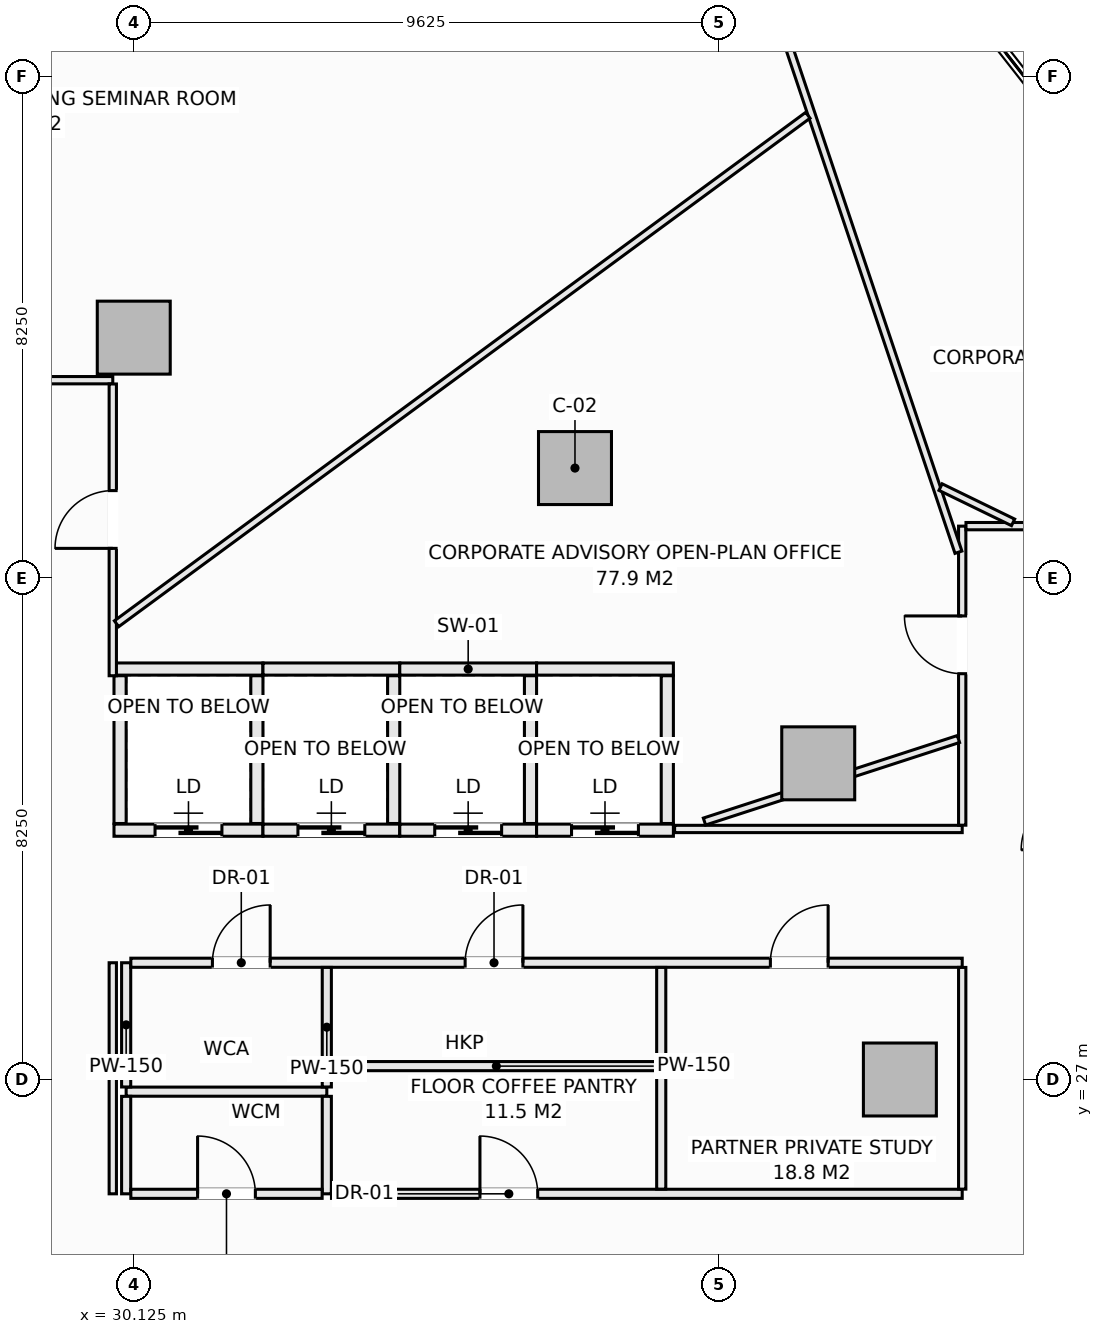
"""IFC4 building model, lengths in metres.
Left out: names, types, materials, properties, quantities, classifications, styles, units other than length and angle.
Written with IfcOpenShell. Run it as: python <this file> out.ifc"""

import sys

from ifc_helpers import new_model, si_unit, direction, frame, frame_2d, origin, origin_2d, place, context, subcontext, project, spatial, rectangle, extrude, element, fill, save


model = new_model("IFC4")
c1 = context("Model", 3, precision=1e-05, world=origin(), true_north=direction((0.0, 1.0)))
c2 = subcontext(c1, "Body", "Model", "MODEL_VIEW")
j1 = project(units=[si_unit("LENGTHUNIT", "METRE"), si_unit("PLANEANGLEUNIT", "RADIAN")], contexts=[c1])
p1 = place(None, origin())
s1 = spatial("IfcSite", under=j1, at=p1, CompositionType="ELEMENT")
p2 = place(p1, origin())
s2 = spatial("IfcBuilding", under=s1, at=p2, CompositionType="ELEMENT")
p3 = place(p2, frame((0.0, 0.0, 91.95)))
s3 = spatial("IfcBuildingStorey", under=s2, at=p3, CompositionType="ELEMENT", Elevation=91.95)
for number, where, z_axis, x_axis in (
    (1, (42.725, 27.0, -0.28), (0.0, 0.0, 1.0), (1.0, 0.0, 0.0)),
    (2, (41.382, 32.199, -0.28), (0.0, 0.0, 1.0), (1.0, 0.0, 0.0)),
    (3, (37.382, 37.055, -0.28), (0.0, 0.0, 1.0), (1.0, 0.0, 0.0)),
    (4, (30.125, 39.2, -0.28), (0.0, 0.0, 1.0), (1.0, 0.0, 0.0)),
):
    element("IfcColumn", number, at=place(p3, frame(where, z_axis=z_axis, x_axis=x_axis)), inside=s3, PredefinedType="COLUMN", context=c2, shape_type="SweptSolid", body=[
        extrude(rectangle(XDim=1.2, YDim=1.2, at=origin_2d()), origin(), (0.0, 0.0, 1.0), 3.81),
    ])
p4 = place(p3, frame((29.8, 33.75, 0.0), z_axis=(0.0, 0.0, 1.0), x_axis=(1.0, 0.0, 0.0)))
e5 = element("IfcWall", 5, at=p4, inside=s3, PredefinedType="SOLIDWALL", context=c2, shape_type="SweptSolid", body=[
    extrude(rectangle(XDim=2.45, YDim=0.2, at=frame_2d((1.225, 0.0))), origin(), (0.0, 0.0, 1.0), 3.53),
])
p5 = place(p3, frame((29.8, 31.1, 0.0), z_axis=(0.0, 0.0, 1.0), x_axis=(1.0, 0.0, 0.0)))
e6 = element("IfcWall", 6, at=p5, inside=s3, PredefinedType="SOLIDWALL", context=c2, shape_type="SweptSolid", body=[
    extrude(rectangle(XDim=2.45, YDim=0.2, at=frame_2d((1.225, 0.0))), origin(), (0.0, 0.0, 1.0), 3.53),
])
p6 = place(p5, frame((0.675, 0.0, 0.0)))
e7 = element("IfcOpeningElement", 7, at=p6, cuts=e6, PredefinedType="OPENING", context=c2, shape_type="SweptSolid", body=[
    extrude(rectangle(XDim=1.1, YDim=2.2, at=frame_2d((0.55, 1.1))), frame((0.0, 0.11, 0.0), z_axis=(0.0, -1.0, 0.0), x_axis=(1.0, 0.0, 0.0)), (0.0, 0.0, 1.0), 0.22),
])
for number, where, z_axis, x_axis in (
    (8, (29.9, 31.21, 0.0), (0.0, 0.0, 1.0), (0.0, 1.0, 0.0)),
    (9, (32.15, 31.21, 0.0), (0.0, 0.0, 1.0), (0.0, 1.0, 0.0)),
):
    element("IfcWall", number, at=place(p3, frame(where, z_axis=z_axis, x_axis=x_axis)), inside=s3, PredefinedType="SOLIDWALL", context=c2, shape_type="SweptSolid", body=[
        extrude(rectangle(XDim=2.43, YDim=0.2, at=frame_2d((1.215, 0.0))), origin(), (0.0, 0.0, 1.0), 3.53),
    ])
p7 = place(p3, frame((32.25, 33.75, 0.0), z_axis=(0.0, 0.0, 1.0), x_axis=(1.0, 0.0, 0.0)))
e10 = element("IfcWall", 10, at=p7, inside=s3, PredefinedType="SOLIDWALL", context=c2, shape_type="SweptSolid", body=[
    extrude(rectangle(XDim=2.25, YDim=0.2, at=frame_2d((1.125, 0.0))), origin(), (0.0, 0.0, 1.0), 3.53),
])
p8 = place(p3, frame((32.25, 31.1, 0.0), z_axis=(0.0, 0.0, 1.0), x_axis=(1.0, 0.0, 0.0)))
e11 = element("IfcWall", 11, at=p8, inside=s3, PredefinedType="SOLIDWALL", context=c2, shape_type="SweptSolid", body=[
    extrude(rectangle(XDim=2.25, YDim=0.2, at=frame_2d((1.125, 0.0))), origin(), (0.0, 0.0, 1.0), 3.53),
])
p9 = place(p8, frame((0.575, 0.0, 0.0)))
e12 = element("IfcOpeningElement", 12, at=p9, cuts=e11, PredefinedType="OPENING", context=c2, shape_type="SweptSolid", body=[
    extrude(rectangle(XDim=1.1, YDim=2.2, at=frame_2d((0.55, 1.1))), frame((0.0, 0.11, 0.0), z_axis=(0.0, -1.0, 0.0), x_axis=(1.0, 0.0, 0.0)), (0.0, 0.0, 1.0), 0.22),
])
p10 = place(p3, frame((34.4, 31.21, 0.0), z_axis=(0.0, 0.0, 1.0), x_axis=(0.0, 1.0, 0.0)))
e13 = element("IfcWall", 13, at=p10, inside=s3, PredefinedType="SOLIDWALL", context=c2, shape_type="SweptSolid", body=[
    extrude(rectangle(XDim=2.43, YDim=0.2, at=frame_2d((1.215, 0.0))), origin(), (0.0, 0.0, 1.0), 3.53),
])
p11 = place(p3, frame((34.5, 33.75, 0.0), z_axis=(0.0, 0.0, 1.0), x_axis=(1.0, 0.0, 0.0)))
e14 = element("IfcWall", 14, at=p11, inside=s3, PredefinedType="SOLIDWALL", context=c2, shape_type="SweptSolid", body=[
    extrude(rectangle(XDim=2.25, YDim=0.2, at=frame_2d((1.125, 0.0))), origin(), (0.0, 0.0, 1.0), 3.53),
])
p12 = place(p3, frame((34.5, 31.1, 0.0), z_axis=(0.0, 0.0, 1.0), x_axis=(1.0, 0.0, 0.0)))
e15 = element("IfcWall", 15, at=p12, inside=s3, PredefinedType="SOLIDWALL", context=c2, shape_type="SweptSolid", body=[
    extrude(rectangle(XDim=2.25, YDim=0.2, at=frame_2d((1.125, 0.0))), origin(), (0.0, 0.0, 1.0), 3.53),
])
p13 = place(p12, frame((0.575, 0.0, 0.0)))
e16 = element("IfcOpeningElement", 16, at=p13, cuts=e15, PredefinedType="OPENING", context=c2, shape_type="SweptSolid", body=[
    extrude(rectangle(XDim=1.1, YDim=2.2, at=frame_2d((0.55, 1.1))), frame((0.0, 0.11, 0.0), z_axis=(0.0, -1.0, 0.0), x_axis=(1.0, 0.0, 0.0)), (0.0, 0.0, 1.0), 0.22),
])
p14 = place(p3, frame((36.65, 31.21, 0.0), z_axis=(0.0, 0.0, 1.0), x_axis=(0.0, 1.0, 0.0)))
e17 = element("IfcWall", 17, at=p14, inside=s3, PredefinedType="SOLIDWALL", context=c2, shape_type="SweptSolid", body=[
    extrude(rectangle(XDim=2.43, YDim=0.2, at=frame_2d((1.215, 0.0))), origin(), (0.0, 0.0, 1.0), 3.53),
])
p15 = place(p3, frame((36.75, 33.75, 0.0), z_axis=(0.0, 0.0, 1.0), x_axis=(1.0, 0.0, 0.0)))
e18 = element("IfcWall", 18, at=p15, inside=s3, PredefinedType="SOLIDWALL", context=c2, shape_type="SweptSolid", body=[
    extrude(rectangle(XDim=2.25, YDim=0.2, at=frame_2d((1.125, 0.0))), origin(), (0.0, 0.0, 1.0), 3.53),
])
p16 = place(p3, frame((36.75, 31.1, 0.0), z_axis=(0.0, 0.0, 1.0), x_axis=(1.0, 0.0, 0.0)))
e19 = element("IfcWall", 19, at=p16, inside=s3, PredefinedType="SOLIDWALL", context=c2, shape_type="SweptSolid", body=[
    extrude(rectangle(XDim=2.25, YDim=0.2, at=frame_2d((1.125, 0.0))), origin(), (0.0, 0.0, 1.0), 3.53),
])
p17 = place(p16, frame((0.575, 0.0, 0.0)))
e20 = element("IfcOpeningElement", 20, at=p17, cuts=e19, PredefinedType="OPENING", context=c2, shape_type="SweptSolid", body=[
    extrude(rectangle(XDim=1.1, YDim=2.2, at=frame_2d((0.55, 1.1))), frame((0.0, 0.11, 0.0), z_axis=(0.0, -1.0, 0.0), x_axis=(1.0, 0.0, 0.0)), (0.0, 0.0, 1.0), 0.22),
])
p18 = place(p3, frame((38.9, 31.21, 0.0), z_axis=(0.0, 0.0, 1.0), x_axis=(0.0, 1.0, 0.0)))
e21 = element("IfcWall", 21, at=p18, inside=s3, PredefinedType="SOLIDWALL", context=c2, shape_type="SweptSolid", body=[
    extrude(rectangle(XDim=2.43, YDim=0.2, at=frame_2d((1.215, 0.0))), origin(), (0.0, 0.0, 1.0), 3.53),
])
p19 = place(p3, frame((30.0, 26.8, 0.0), z_axis=(0.0, 0.0, 1.0), x_axis=(1.0, 0.0, 0.0)))
e22 = element("IfcWall", 22, at=p19, inside=s3, PredefinedType="PARTITIONING", context=c2, shape_type="SweptSolid", body=[
    extrude(rectangle(XDim=3.3, YDim=0.15, at=frame_2d((1.65, 0.0))), origin(), (0.0, 0.0, 1.0), 3.53),
])
p20 = place(p3, frame((30.0, 25.12, 0.0), z_axis=(0.0, 0.0, 1.0), x_axis=(0.0, 1.0, 0.0)))
e23 = element("IfcWall", 23, at=p20, inside=s3, PredefinedType="PARTITIONING", context=c2, shape_type="SweptSolid", body=[
    extrude(rectangle(XDim=1.603, YDim=0.15, at=frame_2d((0.801, 0.0))), origin(), (0.0, 0.0, 1.0), 3.53),
])
p21 = place(p3, frame((30.0, 26.877, 0.0), z_axis=(0.0, 0.0, 1.0), x_axis=(0.0, 1.0, 0.0)))
e24 = element("IfcWall", 24, at=p21, inside=s3, PredefinedType="PARTITIONING", context=c2, shape_type="SweptSolid", body=[
    extrude(rectangle(XDim=2.043, YDim=0.15, at=frame_2d((1.021, 0.0))), origin(), (0.0, 0.0, 1.0), 3.53),
])
p22 = place(p3, frame((30.077, 28.92, 0.0), z_axis=(0.0, 0.0, 1.0), x_axis=(1.0, 0.0, 0.0)))
e25 = element("IfcWall", 25, at=p22, inside=s3, PredefinedType="PARTITIONING", context=c2, shape_type="SweptSolid", body=[
    extrude(rectangle(XDim=13.673, YDim=0.15, at=frame_2d((6.836, 0.0))), origin(), (0.0, 0.0, 1.0), 3.53),
])
p23 = place(p22, frame((1.342, 0.0, 0.0)))
e26 = element("IfcOpeningElement", 26, at=p23, cuts=e25, PredefinedType="OPENING", context=c2, shape_type="SweptSolid", body=[
    extrude(rectangle(XDim=0.95, YDim=2.1, at=frame_2d((0.475, 1.05))), frame((0.0, 0.085, 0.0), z_axis=(0.0, -1.0, 0.0), x_axis=(1.0, 0.0, 0.0)), (0.0, 0.0, 1.0), 0.17),
])
p24 = place(p22, frame((5.498, 0.0, 0.0)))
e27 = element("IfcOpeningElement", 27, at=p24, cuts=e25, PredefinedType="OPENING", context=c2, shape_type="SweptSolid", body=[
    extrude(rectangle(XDim=0.95, YDim=2.1, at=frame_2d((0.475, 1.05))), frame((0.0, 0.085, 0.0), z_axis=(0.0, -1.0, 0.0), x_axis=(1.0, 0.0, 0.0)), (0.0, 0.0, 1.0), 0.17),
])
p25 = place(p22, frame((10.518, 0.0, 0.0)))
e28 = element("IfcOpeningElement", 28, at=p25, cuts=e25, PredefinedType="OPENING", context=c2, shape_type="SweptSolid", body=[
    extrude(rectangle(XDim=0.95, YDim=2.1, at=frame_2d((0.475, 1.05))), frame((0.0, 0.085, 0.0), z_axis=(0.0, -1.0, 0.0), x_axis=(1.0, 0.0, 0.0)), (0.0, 0.0, 1.0), 0.17),
])
p26 = place(p3, frame((33.3, 25.12, 0.0), z_axis=(0.0, 0.0, 1.0), x_axis=(0.0, 1.0, 0.0)))
e29 = element("IfcWall", 29, at=p26, inside=s3, PredefinedType="PARTITIONING", context=c2, shape_type="SweptSolid", body=[
    extrude(rectangle(XDim=1.603, YDim=0.15, at=frame_2d((0.801, 0.0))), origin(), (0.0, 0.0, 1.0), 3.53),
])
p27 = place(p3, frame((33.3, 26.877, 0.0), z_axis=(0.0, 0.0, 1.0), x_axis=(0.0, 1.0, 0.0)))
e30 = element("IfcWall", 30, at=p27, inside=s3, PredefinedType="PARTITIONING", context=c2, shape_type="SweptSolid", body=[
    extrude(rectangle(XDim=1.966, YDim=0.15, at=frame_2d((0.983, 0.0))), origin(), (0.0, 0.0, 1.0), 3.53),
])
p28 = place(p3, frame((30.077, 25.12, 0.0), z_axis=(0.0, 0.0, 1.0), x_axis=(1.0, 0.0, 0.0)))
e31 = element("IfcWall", 31, at=p28, inside=s3, PredefinedType="PARTITIONING", context=c2, shape_type="SweptSolid", body=[
    extrude(rectangle(XDim=3.146, YDim=0.15, at=frame_2d((1.573, 0.0))), origin(), (0.0, 0.0, 1.0), 3.53),
])
p29 = place(p28, frame((1.098, 0.0, 0.0)))
e32 = element("IfcOpeningElement", 32, at=p29, cuts=e31, PredefinedType="OPENING", context=c2, shape_type="SweptSolid", body=[
    extrude(rectangle(XDim=0.95, YDim=2.1, at=frame_2d((0.475, 1.05))), frame((0.0, 0.085, 0.0), z_axis=(0.0, -1.0, 0.0), x_axis=(1.0, 0.0, 0.0)), (0.0, 0.0, 1.0), 0.17),
])
p30 = place(p3, frame((33.377, 25.12, 0.0), z_axis=(0.0, 0.0, 1.0), x_axis=(1.0, 0.0, 0.0)))
e33 = element("IfcWall", 33, at=p30, inside=s3, PredefinedType="PARTITIONING", context=c2, shape_type="SweptSolid", body=[
    extrude(rectangle(XDim=10.373, YDim=0.15, at=frame_2d((5.187, 0.0))), origin(), (0.0, 0.0, 1.0), 3.53),
])
p31 = place(p30, frame((2.441, 0.0, 0.0)))
e34 = element("IfcOpeningElement", 34, at=p31, cuts=e33, PredefinedType="OPENING", context=c2, shape_type="SweptSolid", body=[
    extrude(rectangle(XDim=0.95, YDim=2.1, at=frame_2d((0.475, 1.05))), frame((0.0, 0.085, 0.0), z_axis=(0.0, -1.0, 0.0), x_axis=(1.0, 0.0, 0.0)), (0.0, 0.0, 1.0), 0.17),
])
p32 = place(p3, frame((33.377, 27.22, 0.0), z_axis=(0.0, 0.0, 1.0), x_axis=(1.0, 0.0, 0.0)))
e35 = element("IfcWall", 35, at=p32, inside=s3, PredefinedType="PARTITIONING", context=c2, shape_type="SweptSolid", body=[
    extrude(rectangle(XDim=5.423, YDim=0.15, at=frame_2d((2.711, 0.0))), origin(), (0.0, 0.0, 1.0), 3.53),
])
p33 = place(p3, frame((38.8, 25.197, 0.0), z_axis=(0.0, 0.0, 1.0), x_axis=(0.0, 1.0, 0.0)))
e36 = element("IfcWall", 36, at=p33, inside=s3, PredefinedType="PARTITIONING", context=c2, shape_type="SweptSolid", body=[
    extrude(rectangle(XDim=1.946, YDim=0.15, at=frame_2d((0.973, 0.0))), origin(), (0.0, 0.0, 1.0), 3.53),
])
p34 = place(p3, frame((38.8, 27.297, 0.0), z_axis=(0.0, 0.0, 1.0), x_axis=(0.0, 1.0, 0.0)))
e37 = element("IfcWall", 37, at=p34, inside=s3, PredefinedType="PARTITIONING", context=c2, shape_type="SweptSolid", body=[
    extrude(rectangle(XDim=1.546, YDim=0.15, at=frame_2d((0.773, 0.0))), origin(), (0.0, 0.0, 1.0), 3.53),
])
p35 = place(p3, frame((27.25, 38.5, 0.0), z_axis=(0.0, 0.0, 1.0), x_axis=(1.0, 0.0, 0.0)))
e38 = element("IfcWall", 38, at=p35, inside=s3, PredefinedType="PARTITIONING", context=c2, shape_type="SweptSolid", body=[
    extrude(rectangle(XDim=2.53, YDim=0.12, at=frame_2d((1.265, 0.0))), origin(), (0.0, 0.0, 1.0), 3.53),
])
p36 = place(p3, frame((29.78, 25.12, 0.0), z_axis=(0.0, 0.0, 1.0), x_axis=(0.0, 1.0, 0.0)))
e39 = element("IfcWall", 39, at=p36, inside=s3, PredefinedType="PARTITIONING", context=c2, shape_type="SweptSolid", body=[
    extrude(rectangle(XDim=3.8, YDim=0.12, at=frame_2d((1.9, 0.0))), origin(), (0.0, 0.0, 1.0), 3.53),
])
p37 = place(p3, frame((29.78, 33.64, 0.0), z_axis=(0.0, 0.0, 1.0), x_axis=(0.0, 1.0, 0.0)))
e40 = element("IfcWall", 40, at=p37, inside=s3, PredefinedType="PARTITIONING", context=c2, shape_type="SweptSolid", body=[
    extrude(rectangle(XDim=4.798, YDim=0.12, at=frame_2d((2.399, 0.0))), origin(), (0.0, 0.0, 1.0), 3.53),
])
p38 = place(p37, frame((2.094, 0.0, 0.0)))
e41 = element("IfcOpeningElement", 41, at=p38, cuts=e40, PredefinedType="OPENING", context=c2, shape_type="SweptSolid", body=[
    extrude(rectangle(XDim=0.95, YDim=2.1, at=frame_2d((0.475, 1.05))), frame((0.0, 0.07, 0.0), z_axis=(0.0, -1.0, 0.0), x_axis=(1.0, 0.0, 0.0)), (0.0, 0.0, 1.0), 0.14),
])
p39 = place(p3, frame((39.02, 31.12, 0.0), z_axis=(0.0, 0.0, 1.0), x_axis=(1.0, 0.0, 0.0)))
e42 = element("IfcWall", 42, at=p39, inside=s3, PredefinedType="PARTITIONING", context=c2, shape_type="SweptSolid", body=[
    extrude(rectangle(XDim=4.73, YDim=0.12, at=frame_2d((2.365, 0.0))), origin(), (0.0, 0.0, 1.0), 3.53),
])
p40 = place(p3, frame((43.75, 25.197, 0.0), z_axis=(0.0, 0.0, 1.0), x_axis=(0.0, 1.0, 0.0)))
e43 = element("IfcWall", 43, at=p40, inside=s3, PredefinedType="PARTITIONING", context=c2, shape_type="SweptSolid", body=[
    extrude(rectangle(XDim=3.646, YDim=0.12, at=frame_2d((1.823, 0.0))), origin(), (0.0, 0.0, 1.0), 3.53),
])
p41 = place(p3, frame((43.75, 31.182, 0.0), z_axis=(0.0, 0.0, 1.0), x_axis=(0.0, 1.0, 0.0)))
e44 = element("IfcWall", 44, at=p41, inside=s3, PredefinedType="PARTITIONING", context=c2, shape_type="SweptSolid", body=[
    extrude(rectangle(XDim=4.918, YDim=0.12, at=frame_2d((2.459, 0.0))), origin(), (0.0, 0.0, 1.0), 3.53),
])
p42 = place(p41, frame((2.491, 0.0, 0.0)))
e45 = element("IfcOpeningElement", 45, at=p42, cuts=e44, PredefinedType="OPENING", context=c2, shape_type="SweptSolid", body=[
    extrude(rectangle(XDim=0.95, YDim=2.1, at=frame_2d((0.475, 1.05))), frame((0.0, 0.07, 0.0), z_axis=(0.0, -1.0, 0.0), x_axis=(1.0, 0.0, 0.0)), (0.0, 0.0, 1.0), 0.14),
])
p43 = place(p3, frame((43.812, 36.1, 0.0), z_axis=(0.0, 0.0, 1.0), x_axis=(1.0, 0.0, 0.0)))
e46 = element("IfcWall", 46, at=p43, inside=s3, PredefinedType="PARTITIONING", context=c2, shape_type="SweptSolid", body=[
    extrude(rectangle(XDim=4.012, YDim=0.12, at=frame_2d((2.006, 0.0))), origin(), (0.0, 0.0, 1.0), 3.53),
])
p44 = place(p43, frame((1.623, 0.0, 0.0)))
e47 = element("IfcOpeningElement", 47, at=p44, cuts=e46, PredefinedType="OPENING", context=c2, shape_type="SweptSolid", body=[
    extrude(rectangle(XDim=0.95, YDim=2.1, at=frame_2d((0.475, 1.05))), frame((0.0, 0.07, 0.0), z_axis=(0.0, -1.0, 0.0), x_axis=(1.0, 0.0, 0.0)), (0.0, 0.0, 1.0), 0.14),
])
p45 = place(p3, frame((40.15, 46.215, 0.0), z_axis=(0.0, 0.0, 1.0), x_axis=(0.318097538603, -0.948057991863, 0.0)))
e48 = element("IfcWall", 48, at=p45, inside=s3, PredefinedType="PARTITIONING", context=c2, shape_type="SweptSolid", body=[
    extrude(rectangle(XDim=11.121, YDim=0.12, at=frame_2d((5.561, 0.0))), origin(), (0.0, 0.0, 1.0), 3.53),
])
p46 = place(p3, frame((39.511, 31.242, 0.0), z_axis=(0.0, 0.0, 1.0), x_axis=(0.951052042302, 0.30903076357, 0.0)))
e49 = element("IfcWall", 49, at=p46, inside=s3, PredefinedType="PARTITIONING", context=c2, shape_type="SweptSolid", body=[
    extrude(rectangle(XDim=4.392, YDim=0.12, at=frame_2d((2.196, 0.0))), origin(), (0.0, 0.0, 1.0), 3.53),
])
p47 = place(p3, frame((43.394, 36.742, 0.0), z_axis=(0.0, 0.0, 1.0), x_axis=(0.899305525601, -0.437320902339, 0.0)))
e50 = element("IfcWall", 50, at=p47, inside=s3, PredefinedType="PARTITIONING", context=c2, shape_type="SweptSolid", body=[
    extrude(rectangle(XDim=1.326, YDim=0.12, at=frame_2d((0.663, 0.0))), origin(), (0.0, 0.0, 1.0), 3.53),
])
p48 = place(p3, frame((29.842, 34.495, 0.0), z_axis=(0.0, 0.0, 1.0), x_axis=(0.805582047077, 0.592484232219, 0.0)))
e51 = element("IfcWall", 51, at=p48, inside=s3, PredefinedType="PARTITIONING", context=c2, shape_type="SweptSolid", body=[
    extrude(rectangle(XDim=14.114, YDim=0.12, at=frame_2d((7.057, 0.0))), origin(), (0.0, 0.0, 1.0), 2.894),
])
p49 = place(p6, origin())
e52 = element("IfcDoor", 52, at=p49, inside=s3, OperationType="SLIDING_TO_LEFT", PredefinedType="DOOR", context=c2, shape_type="SweptSolid", body=[
    extrude(rectangle(XDim=1.1, YDim=2.2, at=frame_2d((0.55, 1.1))), frame((0.0, 0.025, 0.0), z_axis=(0.0, -1.0, 0.0), x_axis=(1.0, 0.0, 0.0)), (0.0, 0.0, 1.0), 0.05),
])
fill(e7, e52)
p50 = place(p9, origin())
e53 = element("IfcDoor", 53, at=p50, inside=s3, OperationType="SLIDING_TO_LEFT", PredefinedType="DOOR", context=c2, shape_type="SweptSolid", body=[
    extrude(rectangle(XDim=1.1, YDim=2.2, at=frame_2d((0.55, 1.1))), frame((0.0, 0.025, 0.0), z_axis=(0.0, -1.0, 0.0), x_axis=(1.0, 0.0, 0.0)), (0.0, 0.0, 1.0), 0.05),
])
fill(e12, e53)
p51 = place(p13, origin())
e54 = element("IfcDoor", 54, at=p51, inside=s3, OperationType="SLIDING_TO_LEFT", PredefinedType="DOOR", context=c2, shape_type="SweptSolid", body=[
    extrude(rectangle(XDim=1.1, YDim=2.2, at=frame_2d((0.55, 1.1))), frame((0.0, 0.025, 0.0), z_axis=(0.0, -1.0, 0.0), x_axis=(1.0, 0.0, 0.0)), (0.0, 0.0, 1.0), 0.05),
])
fill(e16, e54)
p52 = place(p17, origin())
e55 = element("IfcDoor", 55, at=p52, inside=s3, OperationType="SLIDING_TO_LEFT", PredefinedType="DOOR", context=c2, shape_type="SweptSolid", body=[
    extrude(rectangle(XDim=1.1, YDim=2.2, at=frame_2d((0.55, 1.1))), frame((0.0, 0.025, 0.0), z_axis=(0.0, -1.0, 0.0), x_axis=(1.0, 0.0, 0.0)), (0.0, 0.0, 1.0), 0.05),
])
fill(e20, e55)
p53 = place(p23, origin())
e56 = element("IfcDoor", 56, at=p53, inside=s3, OperationType="SINGLE_SWING_RIGHT", PredefinedType="DOOR", context=c2, shape_type="SweptSolid", body=[
    extrude(rectangle(XDim=0.95, YDim=2.1, at=frame_2d((0.475, 1.05))), frame((0.0, 0.025, 0.0), z_axis=(0.0, -1.0, 0.0), x_axis=(1.0, 0.0, 0.0)), (0.0, 0.0, 1.0), 0.05),
])
fill(e26, e56)
p54 = place(p29, origin())
e57 = element("IfcDoor", 57, at=p54, inside=s3, OperationType="SINGLE_SWING_LEFT", PredefinedType="DOOR", context=c2, shape_type="SweptSolid", body=[
    extrude(rectangle(XDim=0.95, YDim=2.1, at=frame_2d((0.475, 1.05))), frame((0.0, 0.025, 0.0), z_axis=(0.0, -1.0, 0.0), x_axis=(1.0, 0.0, 0.0)), (0.0, 0.0, 1.0), 0.05),
])
fill(e32, e57)
p55 = place(p24, origin())
e58 = element("IfcDoor", 58, at=p55, inside=s3, OperationType="SINGLE_SWING_RIGHT", PredefinedType="DOOR", context=c2, shape_type="SweptSolid", body=[
    extrude(rectangle(XDim=0.95, YDim=2.1, at=frame_2d((0.475, 1.05))), frame((0.0, 0.025, 0.0), z_axis=(0.0, -1.0, 0.0), x_axis=(1.0, 0.0, 0.0)), (0.0, 0.0, 1.0), 0.05),
])
fill(e27, e58)
p56 = place(p31, origin())
e59 = element("IfcDoor", 59, at=p56, inside=s3, OperationType="SINGLE_SWING_LEFT", PredefinedType="DOOR", context=c2, shape_type="SweptSolid", body=[
    extrude(rectangle(XDim=0.95, YDim=2.1, at=frame_2d((0.475, 1.05))), frame((0.0, 0.025, 0.0), z_axis=(0.0, -1.0, 0.0), x_axis=(1.0, 0.0, 0.0)), (0.0, 0.0, 1.0), 0.05),
])
fill(e34, e59)
p57 = place(p25, origin())
e60 = element("IfcDoor", 60, at=p57, inside=s3, OperationType="SINGLE_SWING_RIGHT", PredefinedType="DOOR", context=c2, shape_type="SweptSolid", body=[
    extrude(rectangle(XDim=0.95, YDim=2.1, at=frame_2d((0.475, 1.05))), frame((0.0, 0.025, 0.0), z_axis=(0.0, -1.0, 0.0), x_axis=(1.0, 0.0, 0.0)), (0.0, 0.0, 1.0), 0.05),
])
fill(e28, e60)
p58 = place(p42, origin())
e61 = element("IfcDoor", 61, at=p58, inside=s3, OperationType="SINGLE_SWING_RIGHT", PredefinedType="DOOR", context=c2, shape_type="SweptSolid", body=[
    extrude(rectangle(XDim=0.95, YDim=2.1, at=frame_2d((0.475, 1.05))), frame((0.0, 0.025, 0.0), z_axis=(0.0, -1.0, 0.0), x_axis=(1.0, 0.0, 0.0)), (0.0, 0.0, 1.0), 0.05),
])
fill(e45, e61)
p59 = place(p38, origin())
e62 = element("IfcDoor", 62, at=p59, inside=s3, OperationType="SINGLE_SWING_LEFT", PredefinedType="DOOR", context=c2, shape_type="SweptSolid", body=[
    extrude(rectangle(XDim=0.95, YDim=2.1, at=frame_2d((0.475, 1.05))), frame((0.0, 0.025, 0.0), z_axis=(0.0, -1.0, 0.0), x_axis=(1.0, 0.0, 0.0)), (0.0, 0.0, 1.0), 0.05),
])
fill(e41, e62)
save(model, sys.argv[1])
